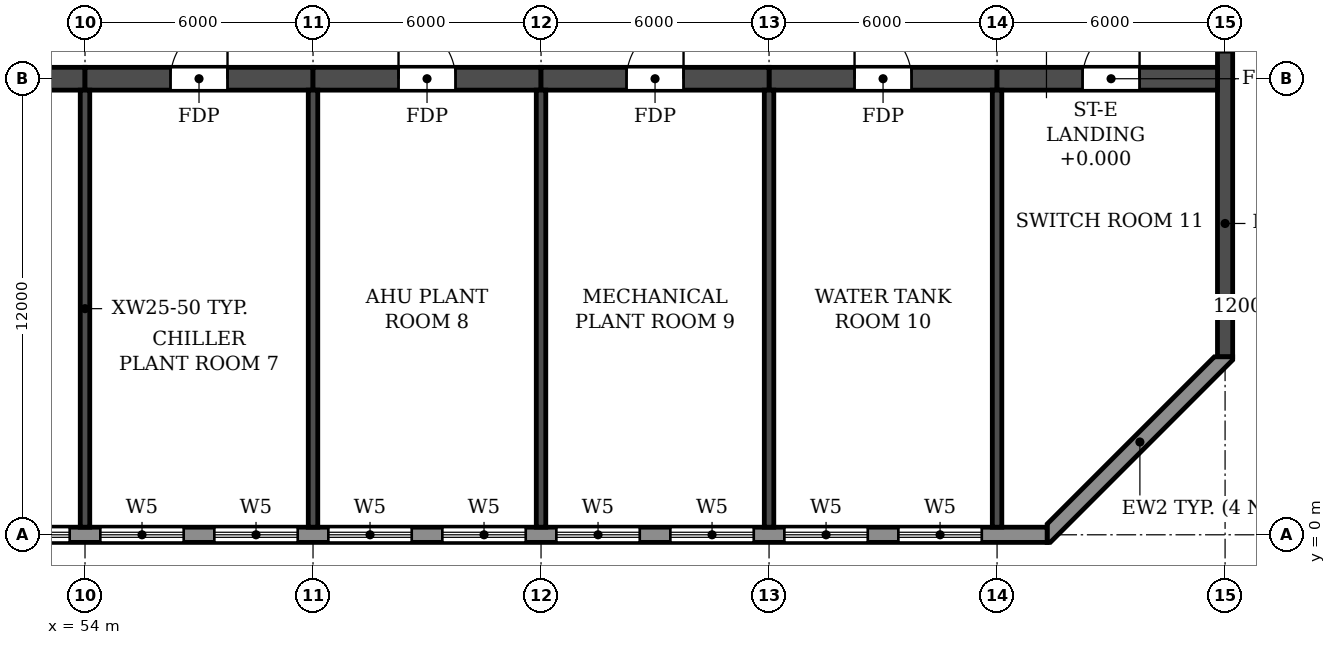
"""IFC4 building model, lengths in metres.
Left out: names, types, materials, properties, quantities, classifications, styles, units other than length and angle.
Written with IfcOpenShell. Run it as: python <this file> out.ifc"""

import sys

from ifc_helpers import new_model, si_unit, direction, frame, frame_2d, origin, place, context, subcontext, project, spatial, polyline, rectangle, outline, extrude, element, fill, save


model = new_model("IFC4")
c1 = context("Model", 3, precision=1e-05, world=origin(), true_north=direction((0.0, 1.0)))
c2 = subcontext(c1, "Body", "Model", "MODEL_VIEW")
j1 = project(units=[si_unit("LENGTHUNIT", "METRE"), si_unit("PLANEANGLEUNIT", "RADIAN")], contexts=[c1])
p1 = place(None, origin())
s1 = spatial("IfcSite", under=j1, at=p1, CompositionType="ELEMENT")
p2 = place(p1, origin())
s2 = spatial("IfcBuilding", under=s1, at=p2, CompositionType="ELEMENT")
p3 = place(p2, frame((0.0, 0.0, 214.8)))
s3 = spatial("IfcBuildingStorey", under=s2, at=p3, CompositionType="ELEMENT", Elevation=214.8)
for number, where, z_axis, x_axis in (
    (1, (54.0, 0.2, 0.0), (0.0, 0.0, 1.0), (0.0, 1.0, 0.0)),
    (2, (60.0, 0.2, 0.0), (0.0, 0.0, 1.0), (0.0, 1.0, 0.0)),
    (3, (66.0, 0.2, 0.0), (0.0, 0.0, 1.0), (0.0, 1.0, 0.0)),
    (4, (72.0, 0.2, 0.0), (0.0, 0.0, 1.0), (0.0, 1.0, 0.0)),
    (5, (78.0, 0.2, 0.0), (0.0, 0.0, 1.0), (0.0, 1.0, 0.0)),
):
    element("IfcWall", number, at=place(p3, frame(where, z_axis=z_axis, x_axis=x_axis)), inside=s3, PredefinedType="SHEAR", context=c2, shape_type="SweptSolid", body=[
        extrude(rectangle(XDim=11.5, YDim=0.25, at=frame_2d((5.75, 0.0))), origin(), (0.0, 0.0, 1.0), 6.38),
    ])
p4 = place(p3, frame((84.0, 4.683, 0.0), z_axis=(0.0, 0.0, 1.0), x_axis=(0.0, 1.0, 0.0)))
e6 = element("IfcWall", 6, at=p4, inside=s3, PredefinedType="SHEAR", context=c2, shape_type="SweptSolid", body=[
    extrude(rectangle(XDim=31.834, YDim=0.4, at=frame_2d((15.917, 0.0))), origin(), (0.0, 0.0, 1.0), 6.38),
])
p5 = place(p4, frame((23.817, 0.0, 0.9)))
e7 = element("IfcOpeningElement", 7, at=p5, cuts=e6, PredefinedType="OPENING", context=c2, shape_type="SweptSolid", body=[
    extrude(rectangle(XDim=1.2, YDim=1.5, at=frame_2d((0.6, 0.75))), frame((0.0, 0.21, 0.0), z_axis=(0.0, -1.0, 0.0), x_axis=(1.0, 0.0, 0.0)), (0.0, 0.0, 1.0), 0.42),
])
p6 = place(p4, frame((8.017, 0.0, 0.9)))
e8 = element("IfcOpeningElement", 8, at=p6, cuts=e6, PredefinedType="OPENING", context=c2, shape_type="SweptSolid", body=[
    extrude(rectangle(XDim=1.2, YDim=1.5, at=frame_2d((0.6, 0.75))), frame((0.0, 0.21, 0.0), z_axis=(0.0, -1.0, 0.0), x_axis=(1.0, 0.0, 0.0)), (0.0, 0.0, 1.0), 0.42),
])
p7 = place(p4, frame((15.917, 0.0, 0.9)))
e9 = element("IfcOpeningElement", 9, at=p7, cuts=e6, PredefinedType="OPENING", context=c2, shape_type="SweptSolid", body=[
    extrude(rectangle(XDim=1.2, YDim=1.5, at=frame_2d((0.6, 0.75))), frame((0.0, 0.21, 0.0), z_axis=(0.0, -1.0, 0.0), x_axis=(1.0, 0.0, 0.0)), (0.0, 0.0, 1.0), 0.42),
])
p8 = place(p3, frame((48.0, 12.0, 0.0), z_axis=(0.0, 0.0, 1.0), x_axis=(1.0, 0.0, 0.0)))
e10 = element("IfcWall", 10, at=p8, inside=s3, PredefinedType="SHEAR", context=c2, shape_type="SweptSolid", body=[
    extrude(rectangle(XDim=6.0, YDim=0.6, at=frame_2d((3.0, 0.0))), origin(), (0.0, 0.0, 1.0), 6.38),
])
p9 = place(p8, frame((2.25, 0.0, 0.0)))
e11 = element("IfcOpeningElement", 11, at=p9, cuts=e10, PredefinedType="OPENING", context=c2, shape_type="SweptSolid", body=[
    extrude(rectangle(XDim=1.5, YDim=2.1, at=frame_2d((0.75, 1.05))), frame((0.0, 0.31, 0.0), z_axis=(0.0, -1.0, 0.0), x_axis=(1.0, 0.0, 0.0)), (0.0, 0.0, 1.0), 0.62),
])
p10 = place(p3, frame((54.0, 12.0, 0.0), z_axis=(0.0, 0.0, 1.0), x_axis=(1.0, 0.0, 0.0)))
e12 = element("IfcWall", 12, at=p10, inside=s3, PredefinedType="SHEAR", context=c2, shape_type="SweptSolid", body=[
    extrude(rectangle(XDim=6.0, YDim=0.6, at=frame_2d((3.0, 0.0))), origin(), (0.0, 0.0, 1.0), 6.38),
])
p11 = place(p10, frame((2.25, 0.0, 0.0)))
e13 = element("IfcOpeningElement", 13, at=p11, cuts=e12, PredefinedType="OPENING", context=c2, shape_type="SweptSolid", body=[
    extrude(rectangle(XDim=1.5, YDim=2.1, at=frame_2d((0.75, 1.05))), frame((0.0, 0.31, 0.0), z_axis=(0.0, -1.0, 0.0), x_axis=(1.0, 0.0, 0.0)), (0.0, 0.0, 1.0), 0.62),
])
p12 = place(p3, frame((60.0, 12.0, 0.0), z_axis=(0.0, 0.0, 1.0), x_axis=(1.0, 0.0, 0.0)))
e14 = element("IfcWall", 14, at=p12, inside=s3, PredefinedType="SHEAR", context=c2, shape_type="SweptSolid", body=[
    extrude(rectangle(XDim=6.0, YDim=0.6, at=frame_2d((3.0, 0.0))), origin(), (0.0, 0.0, 1.0), 6.38),
])
p13 = place(p12, frame((2.25, 0.0, 0.0)))
e15 = element("IfcOpeningElement", 15, at=p13, cuts=e14, PredefinedType="OPENING", context=c2, shape_type="SweptSolid", body=[
    extrude(rectangle(XDim=1.5, YDim=2.1, at=frame_2d((0.75, 1.05))), frame((0.0, 0.31, 0.0), z_axis=(0.0, -1.0, 0.0), x_axis=(1.0, 0.0, 0.0)), (0.0, 0.0, 1.0), 0.62),
])
p14 = place(p3, frame((66.0, 12.0, 0.0), z_axis=(0.0, 0.0, 1.0), x_axis=(1.0, 0.0, 0.0)))
e16 = element("IfcWall", 16, at=p14, inside=s3, PredefinedType="SHEAR", context=c2, shape_type="SweptSolid", body=[
    extrude(rectangle(XDim=6.0, YDim=0.6, at=frame_2d((3.0, 0.0))), origin(), (0.0, 0.0, 1.0), 6.38),
])
p15 = place(p14, frame((2.25, 0.0, 0.0)))
e17 = element("IfcOpeningElement", 17, at=p15, cuts=e16, PredefinedType="OPENING", context=c2, shape_type="SweptSolid", body=[
    extrude(rectangle(XDim=1.5, YDim=2.1, at=frame_2d((0.75, 1.05))), frame((0.0, 0.31, 0.0), z_axis=(0.0, -1.0, 0.0), x_axis=(1.0, 0.0, 0.0)), (0.0, 0.0, 1.0), 0.62),
])
p16 = place(p3, frame((72.0, 12.0, 0.0), z_axis=(0.0, 0.0, 1.0), x_axis=(1.0, 0.0, 0.0)))
e18 = element("IfcWall", 18, at=p16, inside=s3, PredefinedType="SHEAR", context=c2, shape_type="SweptSolid", body=[
    extrude(rectangle(XDim=6.0, YDim=0.6, at=frame_2d((3.0, 0.0))), origin(), (0.0, 0.0, 1.0), 6.38),
])
p17 = place(p16, frame((2.25, 0.0, 0.0)))
e19 = element("IfcOpeningElement", 19, at=p17, cuts=e18, PredefinedType="OPENING", context=c2, shape_type="SweptSolid", body=[
    extrude(rectangle(XDim=1.5, YDim=2.1, at=frame_2d((0.75, 1.05))), frame((0.0, 0.31, 0.0), z_axis=(0.0, -1.0, 0.0), x_axis=(1.0, 0.0, 0.0)), (0.0, 0.0, 1.0), 0.62),
])
p18 = place(p3, frame((78.0, 12.0, 0.0), z_axis=(0.0, 0.0, 1.0), x_axis=(1.0, 0.0, 0.0)))
e20 = element("IfcWall", 20, at=p18, inside=s3, PredefinedType="SHEAR", context=c2, shape_type="SweptSolid", body=[
    extrude(rectangle(XDim=5.8, YDim=0.6, at=frame_2d((2.9, 0.0))), origin(), (0.0, 0.0, 1.0), 6.38),
])
p19 = place(p18, frame((2.25, 0.0, 0.0)))
e21 = element("IfcOpeningElement", 21, at=p19, cuts=e20, PredefinedType="OPENING", context=c2, shape_type="SweptSolid", body=[
    extrude(rectangle(XDim=1.5, YDim=2.1, at=frame_2d((0.75, 1.05))), frame((0.0, 0.31, 0.0), z_axis=(0.0, -1.0, 0.0), x_axis=(1.0, 0.0, 0.0)), (0.0, 0.0, 1.0), 0.62),
])
p20 = place(p3, frame((22.683, 0.0, 0.0), z_axis=(0.0, 0.0, 1.0), x_axis=(1.0, 0.0, 0.0)))
e22 = element("IfcWall", 22, at=p20, inside=s3, PredefinedType="STANDARD", context=c2, shape_type="SweptSolid", body=[
    extrude(rectangle(XDim=56.634, YDim=0.4, at=frame_2d((28.317, 0.0))), origin(), (0.0, 0.0, 1.0), 6.38),
])
p21 = place(p20, frame((1.717, 0.0, 0.6)))
e23 = element("IfcOpeningElement", 23, at=p21, cuts=e22, PredefinedType="OPENING", context=c2, shape_type="SweptSolid", body=[
    extrude(rectangle(XDim=2.2, YDim=2.4, at=frame_2d((1.1, 1.2))), frame((0.0, 0.21, 0.0), z_axis=(0.0, -1.0, 0.0), x_axis=(1.0, 0.0, 0.0)), (0.0, 0.0, 1.0), 0.42),
])
p22 = place(p20, frame((4.717, 0.0, 0.6)))
e24 = element("IfcOpeningElement", 24, at=p22, cuts=e22, PredefinedType="OPENING", context=c2, shape_type="SweptSolid", body=[
    extrude(rectangle(XDim=2.2, YDim=2.4, at=frame_2d((1.1, 1.2))), frame((0.0, 0.21, 0.0), z_axis=(0.0, -1.0, 0.0), x_axis=(1.0, 0.0, 0.0)), (0.0, 0.0, 1.0), 0.42),
])
p23 = place(p20, frame((7.717, 0.0, 0.6)))
e25 = element("IfcOpeningElement", 25, at=p23, cuts=e22, PredefinedType="OPENING", context=c2, shape_type="SweptSolid", body=[
    extrude(rectangle(XDim=2.2, YDim=2.4, at=frame_2d((1.1, 1.2))), frame((0.0, 0.21, 0.0), z_axis=(0.0, -1.0, 0.0), x_axis=(1.0, 0.0, 0.0)), (0.0, 0.0, 1.0), 0.42),
])
p24 = place(p20, frame((10.717, 0.0, 0.6)))
e26 = element("IfcOpeningElement", 26, at=p24, cuts=e22, PredefinedType="OPENING", context=c2, shape_type="SweptSolid", body=[
    extrude(rectangle(XDim=2.2, YDim=2.4, at=frame_2d((1.1, 1.2))), frame((0.0, 0.21, 0.0), z_axis=(0.0, -1.0, 0.0), x_axis=(1.0, 0.0, 0.0)), (0.0, 0.0, 1.0), 0.42),
])
p25 = place(p20, frame((13.717, 0.0, 0.6)))
e27 = element("IfcOpeningElement", 27, at=p25, cuts=e22, PredefinedType="OPENING", context=c2, shape_type="SweptSolid", body=[
    extrude(rectangle(XDim=2.2, YDim=2.4, at=frame_2d((1.1, 1.2))), frame((0.0, 0.21, 0.0), z_axis=(0.0, -1.0, 0.0), x_axis=(1.0, 0.0, 0.0)), (0.0, 0.0, 1.0), 0.42),
])
p26 = place(p20, frame((16.717, 0.0, 0.6)))
e28 = element("IfcOpeningElement", 28, at=p26, cuts=e22, PredefinedType="OPENING", context=c2, shape_type="SweptSolid", body=[
    extrude(rectangle(XDim=2.2, YDim=2.4, at=frame_2d((1.1, 1.2))), frame((0.0, 0.21, 0.0), z_axis=(0.0, -1.0, 0.0), x_axis=(1.0, 0.0, 0.0)), (0.0, 0.0, 1.0), 0.42),
])
p27 = place(p20, frame((19.717, 0.0, 0.6)))
e29 = element("IfcOpeningElement", 29, at=p27, cuts=e22, PredefinedType="OPENING", context=c2, shape_type="SweptSolid", body=[
    extrude(rectangle(XDim=2.2, YDim=2.4, at=frame_2d((1.1, 1.2))), frame((0.0, 0.21, 0.0), z_axis=(0.0, -1.0, 0.0), x_axis=(1.0, 0.0, 0.0)), (0.0, 0.0, 1.0), 0.42),
])
p28 = place(p20, frame((22.717, 0.0, 0.6)))
e30 = element("IfcOpeningElement", 30, at=p28, cuts=e22, PredefinedType="OPENING", context=c2, shape_type="SweptSolid", body=[
    extrude(rectangle(XDim=2.2, YDim=2.4, at=frame_2d((1.1, 1.2))), frame((0.0, 0.21, 0.0), z_axis=(0.0, -1.0, 0.0), x_axis=(1.0, 0.0, 0.0)), (0.0, 0.0, 1.0), 0.42),
])
p29 = place(p20, frame((25.717, 0.0, 0.6)))
e31 = element("IfcOpeningElement", 31, at=p29, cuts=e22, PredefinedType="OPENING", context=c2, shape_type="SweptSolid", body=[
    extrude(rectangle(XDim=2.2, YDim=2.4, at=frame_2d((1.1, 1.2))), frame((0.0, 0.21, 0.0), z_axis=(0.0, -1.0, 0.0), x_axis=(1.0, 0.0, 0.0)), (0.0, 0.0, 1.0), 0.42),
])
p30 = place(p20, frame((28.717, 0.0, 0.6)))
e32 = element("IfcOpeningElement", 32, at=p30, cuts=e22, PredefinedType="OPENING", context=c2, shape_type="SweptSolid", body=[
    extrude(rectangle(XDim=2.2, YDim=2.4, at=frame_2d((1.1, 1.2))), frame((0.0, 0.21, 0.0), z_axis=(0.0, -1.0, 0.0), x_axis=(1.0, 0.0, 0.0)), (0.0, 0.0, 1.0), 0.42),
])
p31 = place(p20, frame((31.717, 0.0, 0.6)))
e33 = element("IfcOpeningElement", 33, at=p31, cuts=e22, PredefinedType="OPENING", context=c2, shape_type="SweptSolid", body=[
    extrude(rectangle(XDim=2.2, YDim=2.4, at=frame_2d((1.1, 1.2))), frame((0.0, 0.21, 0.0), z_axis=(0.0, -1.0, 0.0), x_axis=(1.0, 0.0, 0.0)), (0.0, 0.0, 1.0), 0.42),
])
p32 = place(p20, frame((34.717, 0.0, 0.6)))
e34 = element("IfcOpeningElement", 34, at=p32, cuts=e22, PredefinedType="OPENING", context=c2, shape_type="SweptSolid", body=[
    extrude(rectangle(XDim=2.2, YDim=2.4, at=frame_2d((1.1, 1.2))), frame((0.0, 0.21, 0.0), z_axis=(0.0, -1.0, 0.0), x_axis=(1.0, 0.0, 0.0)), (0.0, 0.0, 1.0), 0.42),
])
p33 = place(p20, frame((37.717, 0.0, 0.6)))
e35 = element("IfcOpeningElement", 35, at=p33, cuts=e22, PredefinedType="OPENING", context=c2, shape_type="SweptSolid", body=[
    extrude(rectangle(XDim=2.2, YDim=2.4, at=frame_2d((1.1, 1.2))), frame((0.0, 0.21, 0.0), z_axis=(0.0, -1.0, 0.0), x_axis=(1.0, 0.0, 0.0)), (0.0, 0.0, 1.0), 0.42),
])
p34 = place(p20, frame((40.717, 0.0, 0.6)))
e36 = element("IfcOpeningElement", 36, at=p34, cuts=e22, PredefinedType="OPENING", context=c2, shape_type="SweptSolid", body=[
    extrude(rectangle(XDim=2.2, YDim=2.4, at=frame_2d((1.1, 1.2))), frame((0.0, 0.21, 0.0), z_axis=(0.0, -1.0, 0.0), x_axis=(1.0, 0.0, 0.0)), (0.0, 0.0, 1.0), 0.42),
])
p35 = place(p20, frame((43.717, 0.0, 0.6)))
e37 = element("IfcOpeningElement", 37, at=p35, cuts=e22, PredefinedType="OPENING", context=c2, shape_type="SweptSolid", body=[
    extrude(rectangle(XDim=2.2, YDim=2.4, at=frame_2d((1.1, 1.2))), frame((0.0, 0.21, 0.0), z_axis=(0.0, -1.0, 0.0), x_axis=(1.0, 0.0, 0.0)), (0.0, 0.0, 1.0), 0.42),
])
p36 = place(p20, frame((46.717, 0.0, 0.6)))
e38 = element("IfcOpeningElement", 38, at=p36, cuts=e22, PredefinedType="OPENING", context=c2, shape_type="SweptSolid", body=[
    extrude(rectangle(XDim=2.2, YDim=2.4, at=frame_2d((1.1, 1.2))), frame((0.0, 0.21, 0.0), z_axis=(0.0, -1.0, 0.0), x_axis=(1.0, 0.0, 0.0)), (0.0, 0.0, 1.0), 0.42),
])
p37 = place(p20, frame((49.717, 0.0, 0.6)))
e39 = element("IfcOpeningElement", 39, at=p37, cuts=e22, PredefinedType="OPENING", context=c2, shape_type="SweptSolid", body=[
    extrude(rectangle(XDim=2.2, YDim=2.4, at=frame_2d((1.1, 1.2))), frame((0.0, 0.21, 0.0), z_axis=(0.0, -1.0, 0.0), x_axis=(1.0, 0.0, 0.0)), (0.0, 0.0, 1.0), 0.42),
])
p38 = place(p20, frame((52.717, 0.0, 0.6)))
e40 = element("IfcOpeningElement", 40, at=p38, cuts=e22, PredefinedType="OPENING", context=c2, shape_type="SweptSolid", body=[
    extrude(rectangle(XDim=2.2, YDim=2.4, at=frame_2d((1.1, 1.2))), frame((0.0, 0.21, 0.0), z_axis=(0.0, -1.0, 0.0), x_axis=(1.0, 0.0, 0.0)), (0.0, 0.0, 1.0), 0.42),
])
p39 = place(p3, origin())
e41 = element("IfcWall", 41, at=p39, inside=s3, PredefinedType="STANDARD", context=c2, shape_type="SweptSolid", body=[
    extrude(outline(polyline([(79.317, -0.2), (79.4, -0.2), (84.2, 4.6), (84.2, 4.683), (83.717, 4.683), (79.317, 0.283), (79.317, -0.2)])), origin(), (0.0, 0.0, 1.0), 6.38),
])
p40 = place(p30, origin())
e42 = element("IfcWindow", 42, at=p40, inside=s3, PartitioningType="TRIPLE_PANEL_HORIZONTAL", PredefinedType="WINDOW", context=c2, shape_type="SweptSolid", body=[
    extrude(rectangle(XDim=2.2, YDim=2.4, at=frame_2d((1.1, 1.2))), frame((0.0, 0.03, 0.0), z_axis=(0.0, -1.0, 0.0), x_axis=(1.0, 0.0, 0.0)), (0.0, 0.0, 1.0), 0.06),
])
fill(e32, e42)
p41 = place(p31, origin())
e43 = element("IfcWindow", 43, at=p41, inside=s3, PartitioningType="TRIPLE_PANEL_HORIZONTAL", PredefinedType="WINDOW", context=c2, shape_type="SweptSolid", body=[
    extrude(rectangle(XDim=2.2, YDim=2.4, at=frame_2d((1.1, 1.2))), frame((0.0, 0.03, 0.0), z_axis=(0.0, -1.0, 0.0), x_axis=(1.0, 0.0, 0.0)), (0.0, 0.0, 1.0), 0.06),
])
fill(e33, e43)
p42 = place(p32, origin())
e44 = element("IfcWindow", 44, at=p42, inside=s3, PartitioningType="TRIPLE_PANEL_HORIZONTAL", PredefinedType="WINDOW", context=c2, shape_type="SweptSolid", body=[
    extrude(rectangle(XDim=2.2, YDim=2.4, at=frame_2d((1.1, 1.2))), frame((0.0, 0.03, 0.0), z_axis=(0.0, -1.0, 0.0), x_axis=(1.0, 0.0, 0.0)), (0.0, 0.0, 1.0), 0.06),
])
fill(e34, e44)
p43 = place(p33, origin())
e45 = element("IfcWindow", 45, at=p43, inside=s3, PartitioningType="TRIPLE_PANEL_HORIZONTAL", PredefinedType="WINDOW", context=c2, shape_type="SweptSolid", body=[
    extrude(rectangle(XDim=2.2, YDim=2.4, at=frame_2d((1.1, 1.2))), frame((0.0, 0.03, 0.0), z_axis=(0.0, -1.0, 0.0), x_axis=(1.0, 0.0, 0.0)), (0.0, 0.0, 1.0), 0.06),
])
fill(e35, e45)
p44 = place(p34, origin())
e46 = element("IfcWindow", 46, at=p44, inside=s3, PartitioningType="TRIPLE_PANEL_HORIZONTAL", PredefinedType="WINDOW", context=c2, shape_type="SweptSolid", body=[
    extrude(rectangle(XDim=2.2, YDim=2.4, at=frame_2d((1.1, 1.2))), frame((0.0, 0.03, 0.0), z_axis=(0.0, -1.0, 0.0), x_axis=(1.0, 0.0, 0.0)), (0.0, 0.0, 1.0), 0.06),
])
fill(e36, e46)
p45 = place(p35, origin())
e47 = element("IfcWindow", 47, at=p45, inside=s3, PartitioningType="TRIPLE_PANEL_HORIZONTAL", PredefinedType="WINDOW", context=c2, shape_type="SweptSolid", body=[
    extrude(rectangle(XDim=2.2, YDim=2.4, at=frame_2d((1.1, 1.2))), frame((0.0, 0.03, 0.0), z_axis=(0.0, -1.0, 0.0), x_axis=(1.0, 0.0, 0.0)), (0.0, 0.0, 1.0), 0.06),
])
fill(e37, e47)
p46 = place(p36, origin())
e48 = element("IfcWindow", 48, at=p46, inside=s3, PartitioningType="TRIPLE_PANEL_HORIZONTAL", PredefinedType="WINDOW", context=c2, shape_type="SweptSolid", body=[
    extrude(rectangle(XDim=2.2, YDim=2.4, at=frame_2d((1.1, 1.2))), frame((0.0, 0.03, 0.0), z_axis=(0.0, -1.0, 0.0), x_axis=(1.0, 0.0, 0.0)), (0.0, 0.0, 1.0), 0.06),
])
fill(e38, e48)
p47 = place(p37, origin())
e49 = element("IfcWindow", 49, at=p47, inside=s3, PartitioningType="TRIPLE_PANEL_HORIZONTAL", PredefinedType="WINDOW", context=c2, shape_type="SweptSolid", body=[
    extrude(rectangle(XDim=2.2, YDim=2.4, at=frame_2d((1.1, 1.2))), frame((0.0, 0.03, 0.0), z_axis=(0.0, -1.0, 0.0), x_axis=(1.0, 0.0, 0.0)), (0.0, 0.0, 1.0), 0.06),
])
fill(e39, e49)
p48 = place(p38, origin())
e50 = element("IfcWindow", 50, at=p48, inside=s3, PartitioningType="TRIPLE_PANEL_HORIZONTAL", PredefinedType="WINDOW", context=c2, shape_type="SweptSolid", body=[
    extrude(rectangle(XDim=2.2, YDim=2.4, at=frame_2d((1.1, 1.2))), frame((0.0, 0.03, 0.0), z_axis=(0.0, -1.0, 0.0), x_axis=(1.0, 0.0, 0.0)), (0.0, 0.0, 1.0), 0.06),
])
fill(e40, e50)
p49 = place(p11, origin())
e51 = element("IfcDoor", 51, at=p49, inside=s3, OperationType="DOUBLE_DOOR_SINGLE_SWING", PredefinedType="DOOR", context=c2, shape_type="SweptSolid", body=[
    extrude(rectangle(XDim=1.5, YDim=2.1, at=frame_2d((0.75, 1.05))), frame((0.0, 0.025, 0.0), z_axis=(0.0, -1.0, 0.0), x_axis=(1.0, 0.0, 0.0)), (0.0, 0.0, 1.0), 0.05),
])
fill(e13, e51)
p50 = place(p13, origin())
e52 = element("IfcDoor", 52, at=p50, inside=s3, OperationType="DOUBLE_DOOR_SINGLE_SWING", PredefinedType="DOOR", context=c2, shape_type="SweptSolid", body=[
    extrude(rectangle(XDim=1.5, YDim=2.1, at=frame_2d((0.75, 1.05))), frame((0.0, 0.025, 0.0), z_axis=(0.0, -1.0, 0.0), x_axis=(1.0, 0.0, 0.0)), (0.0, 0.0, 1.0), 0.05),
])
fill(e15, e52)
p51 = place(p15, origin())
e53 = element("IfcDoor", 53, at=p51, inside=s3, OperationType="DOUBLE_DOOR_SINGLE_SWING", PredefinedType="DOOR", context=c2, shape_type="SweptSolid", body=[
    extrude(rectangle(XDim=1.5, YDim=2.1, at=frame_2d((0.75, 1.05))), frame((0.0, 0.025, 0.0), z_axis=(0.0, -1.0, 0.0), x_axis=(1.0, 0.0, 0.0)), (0.0, 0.0, 1.0), 0.05),
])
fill(e17, e53)
p52 = place(p17, origin())
e54 = element("IfcDoor", 54, at=p52, inside=s3, OperationType="DOUBLE_DOOR_SINGLE_SWING", PredefinedType="DOOR", context=c2, shape_type="SweptSolid", body=[
    extrude(rectangle(XDim=1.5, YDim=2.1, at=frame_2d((0.75, 1.05))), frame((0.0, 0.025, 0.0), z_axis=(0.0, -1.0, 0.0), x_axis=(1.0, 0.0, 0.0)), (0.0, 0.0, 1.0), 0.05),
])
fill(e19, e54)
p53 = place(p19, origin())
e55 = element("IfcDoor", 55, at=p53, inside=s3, OperationType="DOUBLE_DOOR_SINGLE_SWING", PredefinedType="DOOR", context=c2, shape_type="SweptSolid", body=[
    extrude(rectangle(XDim=1.5, YDim=2.1, at=frame_2d((0.75, 1.05))), frame((0.0, 0.025, 0.0), z_axis=(0.0, -1.0, 0.0), x_axis=(1.0, 0.0, 0.0)), (0.0, 0.0, 1.0), 0.05),
])
fill(e21, e55)
save(model, sys.argv[1])
